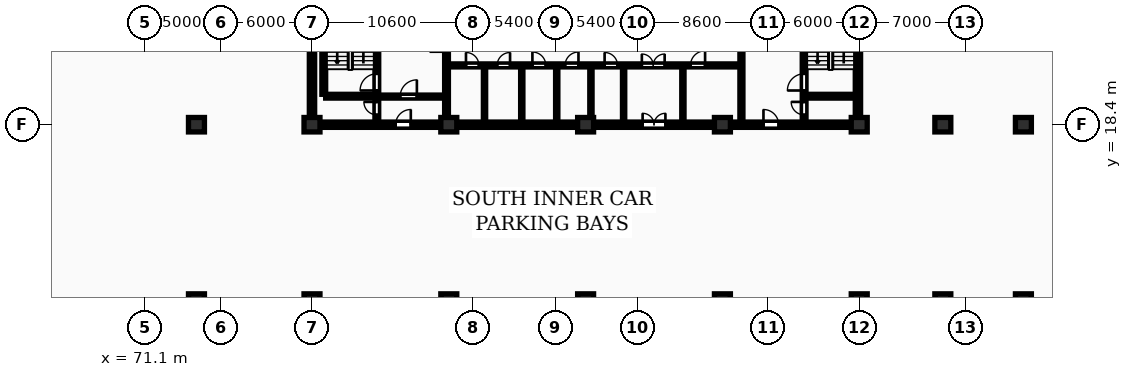
"""IFC4 building model, lengths in metres.
Left out: names, types, materials, properties, quantities, classifications, styles, units other than length and angle.
Written with IfcOpenShell. Run it as: python <this file> out.ifc"""

import sys

from ifc_helpers import new_model, si_unit, direction, frame, frame_2d, origin, origin_2d, place, context, subcontext, project, spatial, rectangle, extrude, element, fill, save


model = new_model("IFC4")
c1 = context("Model", 3, precision=1e-05, world=origin(), true_north=direction((0.0, 1.0)))
c2 = subcontext(c1, "Body", "Model", "MODEL_VIEW")
j1 = project(units=[si_unit("LENGTHUNIT", "METRE"), si_unit("PLANEANGLEUNIT", "RADIAN")], contexts=[c1])
p1 = place(None, origin())
s1 = spatial("IfcSite", under=j1, at=p1, CompositionType="ELEMENT")
p2 = place(p1, origin())
s2 = spatial("IfcBuilding", under=s1, at=p2, CompositionType="ELEMENT")
p3 = place(p2, frame((0.0, 0.0, -10.8)))
s3 = spatial("IfcBuildingStorey", under=s2, at=p3, CompositionType="ELEMENT", Elevation=-10.8)
for number, where, z_axis, x_axis in (
    (1, (74.5, 6.8, -0.45), (0.0, 0.0, 1.0), (1.0, 0.0, 0.0)),
    (2, (74.5, 18.4, -0.45), (0.0, 0.0, 1.0), (1.0, 0.0, 0.0)),
    (3, (82.1, 6.8, -0.45), (0.0, 0.0, 1.0), (1.0, 0.0, 0.0)),
    (4, (82.1, 18.4, -0.45), (0.0, 0.0, 1.0), (1.0, 0.0, 0.0)),
    (5, (91.1, 6.8, -0.45), (0.0, 0.0, 1.0), (1.0, 0.0, 0.0)),
    (6, (91.1, 18.4, -0.45), (0.0, 0.0, 1.0), (1.0, 0.0, 0.0)),
    (7, (100.1, 6.8, -0.45), (0.0, 0.0, 1.0), (1.0, 0.0, 0.0)),
    (8, (100.1, 18.4, -0.45), (0.0, 0.0, 1.0), (1.0, 0.0, 0.0)),
    (9, (109.1, 6.8, -0.45), (0.0, 0.0, 1.0), (1.0, 0.0, 0.0)),
    (10, (109.1, 18.4, -0.45), (0.0, 0.0, 1.0), (1.0, 0.0, 0.0)),
    (11, (118.1, 6.8, -0.45), (0.0, 0.0, 1.0), (1.0, 0.0, 0.0)),
    (12, (118.1, 18.4, -0.45), (0.0, 0.0, 1.0), (1.0, 0.0, 0.0)),
    (13, (123.6, 6.8, -0.45), (0.0, 0.0, 1.0), (1.0, 0.0, 0.0)),
    (14, (123.6, 18.4, -0.45), (0.0, 0.0, 1.0), (1.0, 0.0, 0.0)),
    (15, (128.9, 6.8, -0.45), (0.0, 0.0, 1.0), (1.0, 0.0, 0.0)),
    (16, (128.9, 18.4, -0.45), (0.0, 0.0, 1.0), (1.0, 0.0, 0.0)),
):
    element("IfcColumn", number, at=place(p3, frame(where, z_axis=z_axis, x_axis=x_axis)), inside=s3, PredefinedType="COLUMN", context=c2, shape_type="SweptSolid", body=[
        extrude(rectangle(XDim=1.05, YDim=0.95, at=origin_2d()), origin(), (0.0, 0.0, 1.0), 4.05),
    ])
for number, where, z_axis, x_axis in (
    (17, (82.1, 18.575, 0.0), (0.0, 0.0, 1.0), (0.0, 1.0, 0.0)),
    (18, (118.015, 18.575, 0.0), (0.0, 0.0, 1.0), (0.0, 1.0, 0.0)),
):
    element("IfcWall", number, at=place(p3, frame(where, z_axis=z_axis, x_axis=x_axis)), inside=s3, PredefinedType="SHEAR", context=c2, shape_type="SweptSolid", body=[
        extrude(rectangle(XDim=11.65, YDim=0.35, at=frame_2d((5.825, 0.0))), origin(), (0.0, 0.0, 1.0), 3.6),
    ])
p4 = place(p3, frame((81.925, 18.4, 0.0), z_axis=(0.0, 0.0, 1.0), x_axis=(1.0, 0.0, 0.0)))
e19 = element("IfcWall", 19, at=p4, inside=s3, PredefinedType="SHEAR", context=c2, shape_type="SweptSolid", body=[
    extrude(rectangle(XDim=36.265, YDim=0.35, at=frame_2d((18.132, 0.0))), origin(), (0.0, 0.0, 1.0), 3.6),
])
p5 = place(p4, frame((5.675, 0.0, 0.0)))
e20 = element("IfcOpeningElement", 20, at=p5, cuts=e19, PredefinedType="OPENING", context=c2, shape_type="SweptSolid", body=[
    extrude(rectangle(XDim=1.0, YDim=2.15, at=frame_2d((0.5, 1.075))), frame((0.0, 0.185, 0.0), z_axis=(0.0, -1.0, 0.0), x_axis=(1.0, 0.0, 0.0)), (0.0, 0.0, 1.0), 0.37),
])
p6 = place(p4, frame((21.925, 0.0, 0.0)))
e21 = element("IfcOpeningElement", 21, at=p6, cuts=e19, PredefinedType="OPENING", context=c2, shape_type="SweptSolid", body=[
    extrude(rectangle(XDim=1.5, YDim=2.2, at=frame_2d((0.75, 1.1))), frame((0.0, 0.185, 0.0), z_axis=(0.0, -1.0, 0.0), x_axis=(1.0, 0.0, 0.0)), (0.0, 0.0, 1.0), 0.37),
])
p7 = place(p4, frame((29.875, 0.0, 0.0)))
e22 = element("IfcOpeningElement", 22, at=p7, cuts=e19, PredefinedType="OPENING", context=c2, shape_type="SweptSolid", body=[
    extrude(rectangle(XDim=1.0, YDim=2.15, at=frame_2d((0.5, 1.075))), frame((0.0, 0.185, 0.0), z_axis=(0.0, -1.0, 0.0), x_axis=(1.0, 0.0, 0.0)), (0.0, 0.0, 1.0), 0.37),
])
p8 = place(p3, frame((82.875, 20.4, 0.0), z_axis=(0.0, 0.0, 1.0), x_axis=(0.0, 1.0, 0.0)))
e23 = element("IfcWall", 23, at=p8, inside=s3, PredefinedType="SHEAR", context=c2, shape_type="SweptSolid", body=[
    extrude(rectangle(XDim=7.6, YDim=0.25, at=frame_2d((3.8, 0.0))), origin(), (0.0, 0.0, 1.0), 3.6),
])
p9 = place(p3, frame((86.365, 18.6, 0.0), z_axis=(0.0, 0.0, 1.0), x_axis=(0.0, 1.0, 0.0)))
e24 = element("IfcWall", 24, at=p9, inside=s3, PredefinedType="SHEAR", context=c2, shape_type="SweptSolid", body=[
    extrude(rectangle(XDim=11.6, YDim=0.25, at=frame_2d((5.8, 0.0))), origin(), (0.0, 0.0, 1.0), 3.6),
])
p10 = place(p9, frame((0.45, 0.0, 0.0)))
e25 = element("IfcOpeningElement", 25, at=p10, cuts=e24, PredefinedType="OPENING", context=c2, shape_type="SweptSolid", body=[
    extrude(rectangle(XDim=0.85, YDim=2.05, at=frame_2d((0.425, 1.025))), frame((0.0, 0.135, 0.0), z_axis=(0.0, -1.0, 0.0), x_axis=(1.0, 0.0, 0.0)), (0.0, 0.0, 1.0), 0.27),
])
p11 = place(p9, frame((2.05, 0.0, 0.0)))
e26 = element("IfcOpeningElement", 26, at=p11, cuts=e24, PredefinedType="OPENING", context=c2, shape_type="SweptSolid", body=[
    extrude(rectangle(XDim=1.1, YDim=2.1, at=frame_2d((0.55, 1.05))), frame((0.0, 0.135, 0.0), z_axis=(0.0, -1.0, 0.0), x_axis=(1.0, 0.0, 0.0)), (0.0, 0.0, 1.0), 0.27),
])
p12 = place(p9, frame((9.95, 0.0, 0.0)))
e27 = element("IfcOpeningElement", 27, at=p12, cuts=e24, PredefinedType="OPENING", context=c2, shape_type="SweptSolid", body=[
    extrude(rectangle(XDim=0.85, YDim=2.05, at=frame_2d((0.425, 1.025))), frame((0.0, 0.135, 0.0), z_axis=(0.0, -1.0, 0.0), x_axis=(1.0, 0.0, 0.0)), (0.0, 0.0, 1.0), 0.27),
])
p13 = place(p3, frame((83.0, 20.275, 0.0), z_axis=(0.0, 0.0, 1.0), x_axis=(1.0, 0.0, 0.0)))
e28 = element("IfcWall", 28, at=p13, inside=s3, PredefinedType="SHEAR", context=c2, shape_type="SweptSolid", body=[
    extrude(rectangle(XDim=3.24, YDim=0.25, at=frame_2d((1.62, 0.0))), origin(), (0.0, 0.0, 1.0), 3.6),
])
p14 = place(p3, frame((86.5, 20.25, 0.0), z_axis=(0.0, 0.0, 1.0), x_axis=(1.0, 0.0, 0.0)))
e29 = element("IfcWall", 29, at=p14, inside=s3, PredefinedType="PARTITIONING", context=c2, shape_type="SweptSolid", body=[
    extrude(rectangle(XDim=4.32, YDim=0.2, at=frame_2d((2.16, 0.0))), origin(), (0.0, 0.0, 1.0), 3.3),
])
p15 = place(p14, frame((1.4, 0.0, 0.0)))
e30 = element("IfcOpeningElement", 30, at=p15, cuts=e29, PredefinedType="OPENING", context=c2, shape_type="SweptSolid", body=[
    extrude(rectangle(XDim=1.1, YDim=2.1, at=frame_2d((0.55, 1.05))), frame((0.0, 0.11, 0.0), z_axis=(0.0, -1.0, 0.0), x_axis=(1.0, 0.0, 0.0)), (0.0, 0.0, 1.0), 0.22),
])
p16 = place(p3, frame((90.95, 18.6, 0.0), z_axis=(0.0, 0.0, 1.0), x_axis=(0.0, 1.0, 0.0)))
e31 = element("IfcWall", 31, at=p16, inside=s3, PredefinedType="SHEAR", context=c2, shape_type="SweptSolid", body=[
    extrude(rectangle(XDim=11.6, YDim=0.25, at=frame_2d((5.8, 0.0))), origin(), (0.0, 0.0, 1.0), 3.6),
])
p17 = place(p16, frame((4.6, 0.0, 0.0)))
e32 = element("IfcOpeningElement", 32, at=p17, cuts=e31, PredefinedType="OPENING", context=c2, shape_type="SweptSolid", body=[
    extrude(rectangle(XDim=1.1, YDim=2.1, at=frame_2d((0.55, 1.05))), frame((0.0, 0.135, 0.0), z_axis=(0.0, -1.0, 0.0), x_axis=(1.0, 0.0, 0.0)), (0.0, 0.0, 1.0), 0.27),
])
for number, where, z_axis, x_axis in (
    (33, (93.45, 18.6, 0.0), (0.0, 0.0, 1.0), (0.0, 1.0, 0.0)),
    (34, (95.9, 18.6, 0.0), (0.0, 0.0, 1.0), (0.0, 1.0, 0.0)),
    (35, (98.2, 18.6, 0.0), (0.0, 0.0, 1.0), (0.0, 1.0, 0.0)),
):
    element("IfcWall", number, at=place(p3, frame(where, z_axis=z_axis, x_axis=x_axis)), inside=s3, PredefinedType="PARTITIONING", context=c2, shape_type="SweptSolid", body=[
        extrude(rectangle(XDim=3.6, YDim=0.15, at=frame_2d((1.8, 0.0))), origin(), (0.0, 0.0, 1.0), 3.3),
    ])
p18 = place(p3, frame((100.45, 18.6, 0.0), z_axis=(0.0, 0.0, 1.0), x_axis=(0.0, 1.0, 0.0)))
e36 = element("IfcWall", 36, at=p18, inside=s3, PredefinedType="PARTITIONING", context=c2, shape_type="SweptSolid", body=[
    extrude(rectangle(XDim=3.6, YDim=0.15, at=frame_2d((1.8, 0.0))), origin(), (0.0, 0.0, 1.0), 2.55),
])
for number, where, z_axis, x_axis in (
    (37, (102.6, 18.6, 0.0), (0.0, 0.0, 1.0), (0.0, 1.0, 0.0)),
    (38, (106.5, 18.6, 0.0), (0.0, 0.0, 1.0), (0.0, 1.0, 0.0)),
):
    element("IfcWall", number, at=place(p3, frame(where, z_axis=z_axis, x_axis=x_axis)), inside=s3, PredefinedType="PARTITIONING", context=c2, shape_type="SweptSolid", body=[
        extrude(rectangle(XDim=3.6, YDim=0.15, at=frame_2d((1.8, 0.0))), origin(), (0.0, 0.0, 1.0), 3.3),
    ])
p19 = place(p3, frame((91.08, 22.3, 0.0), z_axis=(0.0, 0.0, 1.0), x_axis=(1.0, 0.0, 0.0)))
e39 = element("IfcWall", 39, at=p19, inside=s3, PredefinedType="PARTITIONING", context=c2, shape_type="SweptSolid", body=[
    extrude(rectangle(XDim=19.14, YDim=0.2, at=frame_2d((9.57, 0.0))), origin(), (0.0, 0.0, 1.0), 3.3),
])
p20 = place(p19, frame((1.15, 0.0, 0.0)))
e40 = element("IfcOpeningElement", 40, at=p20, cuts=e39, PredefinedType="OPENING", context=c2, shape_type="SweptSolid", body=[
    extrude(rectangle(XDim=0.85, YDim=2.05, at=frame_2d((0.425, 1.025))), frame((0.0, 0.11, 0.0), z_axis=(0.0, -1.0, 0.0), x_axis=(1.0, 0.0, 0.0)), (0.0, 0.0, 1.0), 0.22),
])
p21 = place(p19, frame((3.2, 0.0, 0.0)))
e41 = element("IfcOpeningElement", 41, at=p21, cuts=e39, PredefinedType="OPENING", context=c2, shape_type="SweptSolid", body=[
    extrude(rectangle(XDim=0.85, YDim=2.05, at=frame_2d((0.425, 1.025))), frame((0.0, 0.11, 0.0), z_axis=(0.0, -1.0, 0.0), x_axis=(1.0, 0.0, 0.0)), (0.0, 0.0, 1.0), 0.22),
])
p22 = place(p19, frame((12.72, 0.0, 0.0)))
e42 = element("IfcOpeningElement", 42, at=p22, cuts=e39, PredefinedType="OPENING", context=c2, shape_type="SweptSolid", body=[
    extrude(rectangle(XDim=1.5, YDim=2.2, at=frame_2d((0.75, 1.1))), frame((0.0, 0.11, 0.0), z_axis=(0.0, -1.0, 0.0), x_axis=(1.0, 0.0, 0.0)), (0.0, 0.0, 1.0), 0.22),
])
p23 = place(p19, frame((5.52, 0.0, 0.0)))
e43 = element("IfcOpeningElement", 43, at=p23, cuts=e39, PredefinedType="OPENING", context=c2, shape_type="SweptSolid", body=[
    extrude(rectangle(XDim=0.88, YDim=2.06, at=frame_2d((0.44, 1.03))), frame((0.0, 0.11, 0.0), z_axis=(0.0, -1.0, 0.0), x_axis=(1.0, 0.0, 0.0)), (0.0, 0.0, 1.0), 0.22),
])
p24 = place(p19, frame((7.67, 0.0, 0.0)))
e44 = element("IfcOpeningElement", 44, at=p24, cuts=e39, PredefinedType="OPENING", context=c2, shape_type="SweptSolid", body=[
    extrude(rectangle(XDim=0.88, YDim=2.06, at=frame_2d((0.44, 1.03))), frame((0.0, 0.11, 0.0), z_axis=(0.0, -1.0, 0.0), x_axis=(1.0, 0.0, 0.0)), (0.0, 0.0, 1.0), 0.22),
])
p25 = place(p19, frame((10.27, 0.0, 0.0)))
e45 = element("IfcOpeningElement", 45, at=p25, cuts=e39, PredefinedType="OPENING", context=c2, shape_type="SweptSolid", body=[
    extrude(rectangle(XDim=0.85, YDim=2.05, at=frame_2d((0.425, 1.025))), frame((0.0, 0.11, 0.0), z_axis=(0.0, -1.0, 0.0), x_axis=(1.0, 0.0, 0.0)), (0.0, 0.0, 1.0), 0.22),
])
p26 = place(p19, frame((15.92, 0.0, 0.0)))
e46 = element("IfcOpeningElement", 46, at=p26, cuts=e39, PredefinedType="OPENING", context=c2, shape_type="SweptSolid", body=[
    extrude(rectangle(XDim=0.96, YDim=2.1, at=frame_2d((0.48, 1.05))), frame((0.0, 0.11, 0.0), z_axis=(0.0, -1.0, 0.0), x_axis=(1.0, 0.0, 0.0)), (0.0, 0.0, 1.0), 0.22),
])
p27 = place(p3, frame((110.35, 18.6, 0.0), z_axis=(0.0, 0.0, 1.0), x_axis=(0.0, 1.0, 0.0)))
e47 = element("IfcWall", 47, at=p27, inside=s3, PredefinedType="PARTITIONING", context=c2, shape_type="SweptSolid", body=[
    extrude(rectangle(XDim=11.6, YDim=0.2, at=frame_2d((5.8, 0.0))), origin(), (0.0, 0.0, 1.0), 3.3),
])
p28 = place(p27, frame((5.2, 0.0, 0.0)))
e48 = element("IfcOpeningElement", 48, at=p28, cuts=e47, PredefinedType="OPENING", context=c2, shape_type="SweptSolid", body=[
    extrude(rectangle(XDim=1.1, YDim=2.15, at=frame_2d((0.55, 1.075))), frame((0.0, 0.11, 0.0), z_axis=(0.0, -1.0, 0.0), x_axis=(1.0, 0.0, 0.0)), (0.0, 0.0, 1.0), 0.22),
])
p29 = place(p3, frame((114.475, 18.6, 0.0), z_axis=(0.0, 0.0, 1.0), x_axis=(0.0, 1.0, 0.0)))
e49 = element("IfcWall", 49, at=p29, inside=s3, PredefinedType="SHEAR", context=c2, shape_type="SweptSolid", body=[
    extrude(rectangle(XDim=11.6, YDim=0.25, at=frame_2d((5.8, 0.0))), origin(), (0.0, 0.0, 1.0), 3.6),
])
p30 = place(p29, frame((0.45, 0.0, 0.0)))
e50 = element("IfcOpeningElement", 50, at=p30, cuts=e49, PredefinedType="OPENING", context=c2, shape_type="SweptSolid", body=[
    extrude(rectangle(XDim=0.85, YDim=2.05, at=frame_2d((0.425, 1.025))), frame((0.0, 0.135, 0.0), z_axis=(0.0, -1.0, 0.0), x_axis=(1.0, 0.0, 0.0)), (0.0, 0.0, 1.0), 0.27),
])
p31 = place(p29, frame((2.05, 0.0, 0.0)))
e51 = element("IfcOpeningElement", 51, at=p31, cuts=e49, PredefinedType="OPENING", context=c2, shape_type="SweptSolid", body=[
    extrude(rectangle(XDim=1.1, YDim=2.1, at=frame_2d((0.55, 1.05))), frame((0.0, 0.135, 0.0), z_axis=(0.0, -1.0, 0.0), x_axis=(1.0, 0.0, 0.0)), (0.0, 0.0, 1.0), 0.27),
])
p32 = place(p29, frame((9.95, 0.0, 0.0)))
e52 = element("IfcOpeningElement", 52, at=p32, cuts=e49, PredefinedType="OPENING", context=c2, shape_type="SweptSolid", body=[
    extrude(rectangle(XDim=0.85, YDim=2.05, at=frame_2d((0.425, 1.025))), frame((0.0, 0.135, 0.0), z_axis=(0.0, -1.0, 0.0), x_axis=(1.0, 0.0, 0.0)), (0.0, 0.0, 1.0), 0.27),
])
p33 = place(p3, frame((114.6, 20.275, 0.0), z_axis=(0.0, 0.0, 1.0), x_axis=(1.0, 0.0, 0.0)))
e53 = element("IfcWall", 53, at=p33, inside=s3, PredefinedType="SHEAR", context=c2, shape_type="SweptSolid", body=[
    extrude(rectangle(XDim=3.24, YDim=0.25, at=frame_2d((1.62, 0.0))), origin(), (0.0, 0.0, 1.0), 3.6),
])
p34 = place(p5, origin())
e54 = element("IfcDoor", 54, at=p34, inside=s3, OperationType="SINGLE_SWING_RIGHT", PredefinedType="DOOR", context=c2, shape_type="SweptSolid", body=[
    extrude(rectangle(XDim=1.0, YDim=2.15, at=frame_2d((0.5, 1.075))), frame((0.0, 0.025, 0.0), z_axis=(0.0, -1.0, 0.0), x_axis=(1.0, 0.0, 0.0)), (0.0, 0.0, 1.0), 0.05),
])
fill(e20, e54)
p35 = place(p6, origin())
e55 = element("IfcDoor", 55, at=p35, inside=s3, OperationType="DOUBLE_DOOR_SINGLE_SWING", PredefinedType="DOOR", context=c2, shape_type="SweptSolid", body=[
    extrude(rectangle(XDim=1.5, YDim=2.2, at=frame_2d((0.75, 1.1))), frame((0.0, 0.025, 0.0), z_axis=(0.0, -1.0, 0.0), x_axis=(1.0, 0.0, 0.0)), (0.0, 0.0, 1.0), 0.05),
])
fill(e21, e55)
p36 = place(p7, origin())
e56 = element("IfcDoor", 56, at=p36, inside=s3, OperationType="SINGLE_SWING_LEFT", PredefinedType="DOOR", context=c2, shape_type="SweptSolid", body=[
    extrude(rectangle(XDim=1.0, YDim=2.15, at=frame_2d((0.5, 1.075))), frame((0.0, 0.025, 0.0), z_axis=(0.0, -1.0, 0.0), x_axis=(1.0, 0.0, 0.0)), (0.0, 0.0, 1.0), 0.05),
])
fill(e22, e56)
p37 = place(p10, origin())
e57 = element("IfcDoor", 57, at=p37, inside=s3, OperationType="SINGLE_SWING_RIGHT", PredefinedType="DOOR", context=c2, shape_type="SweptSolid", body=[
    extrude(rectangle(XDim=0.85, YDim=2.05, at=frame_2d((0.425, 1.025))), frame((0.0, 0.025, 0.0), z_axis=(0.0, -1.0, 0.0), x_axis=(1.0, 0.0, 0.0)), (0.0, 0.0, 1.0), 0.05),
])
fill(e25, e57)
p38 = place(p11, origin())
e58 = element("IfcDoor", 58, at=p38, inside=s3, OperationType="SINGLE_SWING_LEFT", PredefinedType="DOOR", context=c2, shape_type="SweptSolid", body=[
    extrude(rectangle(XDim=1.1, YDim=2.1, at=frame_2d((0.55, 1.05))), frame((0.0, 0.025, 0.0), z_axis=(0.0, -1.0, 0.0), x_axis=(1.0, 0.0, 0.0)), (0.0, 0.0, 1.0), 0.05),
])
fill(e26, e58)
p39 = place(p15, origin())
e59 = element("IfcDoor", 59, at=p39, inside=s3, OperationType="SINGLE_SWING_RIGHT", PredefinedType="DOOR", context=c2, shape_type="SweptSolid", body=[
    extrude(rectangle(XDim=1.1, YDim=2.1, at=frame_2d((0.55, 1.05))), frame((0.0, 0.025, 0.0), z_axis=(0.0, -1.0, 0.0), x_axis=(1.0, 0.0, 0.0)), (0.0, 0.0, 1.0), 0.05),
])
fill(e30, e59)
p40 = place(p20, origin())
e60 = element("IfcDoor", 60, at=p40, inside=s3, OperationType="SINGLE_SWING_LEFT", PredefinedType="DOOR", context=c2, shape_type="SweptSolid", body=[
    extrude(rectangle(XDim=0.85, YDim=2.05, at=frame_2d((0.425, 1.025))), frame((0.0, 0.025, 0.0), z_axis=(0.0, -1.0, 0.0), x_axis=(1.0, 0.0, 0.0)), (0.0, 0.0, 1.0), 0.05),
])
fill(e40, e60)
p41 = place(p21, origin())
e61 = element("IfcDoor", 61, at=p41, inside=s3, OperationType="SINGLE_SWING_RIGHT", PredefinedType="DOOR", context=c2, shape_type="SweptSolid", body=[
    extrude(rectangle(XDim=0.85, YDim=2.05, at=frame_2d((0.425, 1.025))), frame((0.0, 0.025, 0.0), z_axis=(0.0, -1.0, 0.0), x_axis=(1.0, 0.0, 0.0)), (0.0, 0.0, 1.0), 0.05),
])
fill(e41, e61)
p42 = place(p22, origin())
e62 = element("IfcDoor", 62, at=p42, inside=s3, OperationType="DOUBLE_DOOR_SINGLE_SWING", PredefinedType="DOOR", context=c2, shape_type="SweptSolid", body=[
    extrude(rectangle(XDim=1.5, YDim=2.2, at=frame_2d((0.75, 1.1))), frame((0.0, 0.025, 0.0), z_axis=(0.0, -1.0, 0.0), x_axis=(1.0, 0.0, 0.0)), (0.0, 0.0, 1.0), 0.05),
])
fill(e42, e62)
p43 = place(p23, origin())
e63 = element("IfcDoor", 63, at=p43, inside=s3, OperationType="SINGLE_SWING_LEFT", PredefinedType="DOOR", context=c2, shape_type="SweptSolid", body=[
    extrude(rectangle(XDim=0.88, YDim=2.06, at=frame_2d((0.44, 1.03))), frame((0.0, 0.025, 0.0), z_axis=(0.0, -1.0, 0.0), x_axis=(1.0, 0.0, 0.0)), (0.0, 0.0, 1.0), 0.05),
])
fill(e43, e63)
p44 = place(p24, origin())
e64 = element("IfcDoor", 64, at=p44, inside=s3, OperationType="SINGLE_SWING_RIGHT", PredefinedType="DOOR", context=c2, shape_type="SweptSolid", body=[
    extrude(rectangle(XDim=0.88, YDim=2.06, at=frame_2d((0.44, 1.03))), frame((0.0, 0.025, 0.0), z_axis=(0.0, -1.0, 0.0), x_axis=(1.0, 0.0, 0.0)), (0.0, 0.0, 1.0), 0.05),
])
fill(e44, e64)
p45 = place(p25, origin())
e65 = element("IfcDoor", 65, at=p45, inside=s3, OperationType="SINGLE_SWING_LEFT", PredefinedType="DOOR", context=c2, shape_type="SweptSolid", body=[
    extrude(rectangle(XDim=0.85, YDim=2.05, at=frame_2d((0.425, 1.025))), frame((0.0, 0.025, 0.0), z_axis=(0.0, -1.0, 0.0), x_axis=(1.0, 0.0, 0.0)), (0.0, 0.0, 1.0), 0.05),
])
fill(e45, e65)
p46 = place(p26, origin())
e66 = element("IfcDoor", 66, at=p46, inside=s3, OperationType="SINGLE_SWING_RIGHT", PredefinedType="DOOR", context=c2, shape_type="SweptSolid", body=[
    extrude(rectangle(XDim=0.96, YDim=2.1, at=frame_2d((0.48, 1.05))), frame((0.0, 0.025, 0.0), z_axis=(0.0, -1.0, 0.0), x_axis=(1.0, 0.0, 0.0)), (0.0, 0.0, 1.0), 0.05),
])
fill(e46, e66)
p47 = place(p30, origin())
e67 = element("IfcDoor", 67, at=p47, inside=s3, OperationType="SINGLE_SWING_RIGHT", PredefinedType="DOOR", context=c2, shape_type="SweptSolid", body=[
    extrude(rectangle(XDim=0.85, YDim=2.05, at=frame_2d((0.425, 1.025))), frame((0.0, 0.025, 0.0), z_axis=(0.0, -1.0, 0.0), x_axis=(1.0, 0.0, 0.0)), (0.0, 0.0, 1.0), 0.05),
])
fill(e50, e67)
p48 = place(p31, origin())
e68 = element("IfcDoor", 68, at=p48, inside=s3, OperationType="SINGLE_SWING_LEFT", PredefinedType="DOOR", context=c2, shape_type="SweptSolid", body=[
    extrude(rectangle(XDim=1.1, YDim=2.1, at=frame_2d((0.55, 1.05))), frame((0.0, 0.025, 0.0), z_axis=(0.0, -1.0, 0.0), x_axis=(1.0, 0.0, 0.0)), (0.0, 0.0, 1.0), 0.05),
])
fill(e51, e68)
save(model, sys.argv[1])
